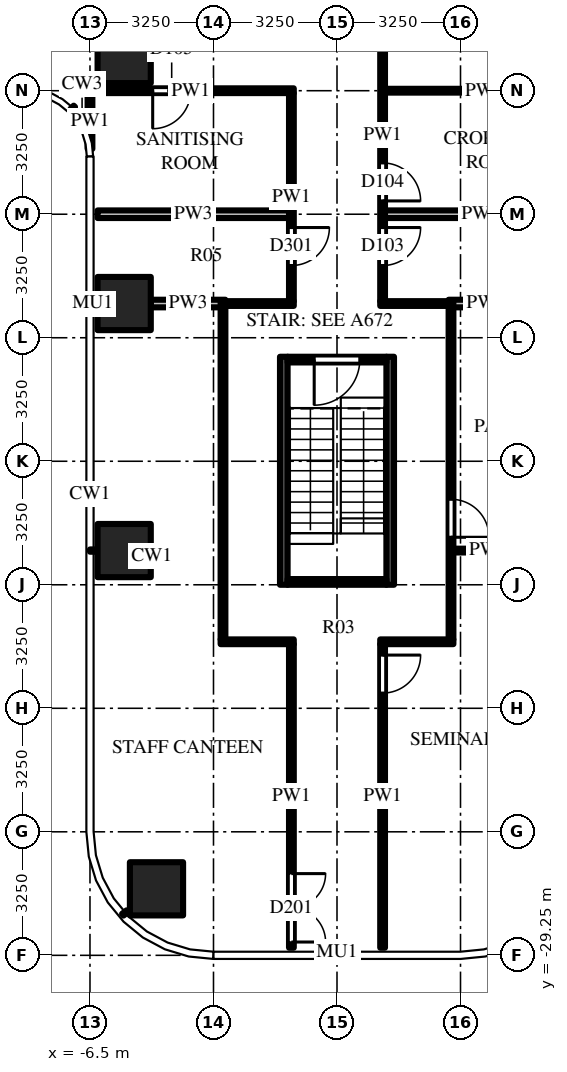
"""IFC4 building model, lengths in metres.
Left out: names, types, materials, properties, quantities, classifications, styles, units other than length and angle.
Written with IfcOpenShell. Run it as: python <this file> out.ifc"""

import sys

from ifc_helpers import new_model, si_unit, direction, frame, frame_2d, origin, origin_2d, place, context, subcontext, project, spatial, rectangle, extrude, source, transform, mapped, element, fill, save


model = new_model("IFC4")
c1 = context("Model", 3, precision=1e-05, world=origin(), true_north=direction((0.0, 1.0)))
c2 = subcontext(c1, "Body", "Model", "MODEL_VIEW")
j1 = project(units=[si_unit("LENGTHUNIT", "METRE"), si_unit("PLANEANGLEUNIT", "RADIAN")], contexts=[c1])
p1 = place(None, origin())
s1 = spatial("IfcSite", under=j1, at=p1, CompositionType="ELEMENT")
p2 = place(p1, origin())
s2 = spatial("IfcBuilding", under=s1, at=p2, CompositionType="ELEMENT")
p3 = place(p2, frame((0.0, 0.0, 47.5)))
s3 = spatial("IfcBuildingStorey", under=s2, at=p3, CompositionType="ELEMENT", Elevation=47.5)
m1 = source(origin(), c2, "Body", "SweptSolid", [
    extrude(rectangle(XDim=1.4, YDim=1.4, at=origin_2d()), origin(), (0.0, 0.0, 1.0), 4.5),
])
for number, where, z_axis, x_axis in (
    (1, (-5.6, -5.6, 0.0), (0.0, 0.0, 1.0), (1.0, 0.0, 0.0)),
    (2, (-5.6, -12.1, 0.0), (0.0, 0.0, 1.0), (1.0, 0.0, 0.0)),
    (3, (-5.6, -18.6, 0.0), (0.0, 0.0, 1.0), (1.0, 0.0, 0.0)),
    (4, (-4.75, -27.5, 0.0), (0.0, 0.0, 1.0), (1.0, 0.0, 0.0)),
):
    element("IfcColumn", number, at=place(p3, frame(where, z_axis=z_axis, x_axis=x_axis)), inside=s3, PredefinedType="COLUMN", context=c2, shape_type="MappedRepresentation", body=[
        mapped(m1, transform((0.0, 0.0, 0.0))),
    ])
m2 = source(origin(), c2, "Body", "SweptSolid", [
    extrude(rectangle(XDim=6.0, YDim=0.2, at=frame_2d((3.0, 0.0))), origin(), (0.0, 0.0, 1.0), 4.25),
])
for number, where, z_axis, x_axis in (
    (5, (1.4, -13.5, 0.0), (0.0, 0.0, 1.0), (0.0, -1.0, 0.0)),
    (6, (-1.4, -13.5, 0.0), (0.0, 0.0, 1.0), (0.0, -1.0, 0.0)),
):
    element("IfcWall", number, at=place(p3, frame(where, z_axis=z_axis, x_axis=x_axis)), inside=s3, PredefinedType="SHEAR", context=c2, shape_type="MappedRepresentation", body=[
        mapped(m2, transform((0.0, 0.0, 0.0))),
    ])
m3 = source(origin(), c2, "Body", "SweptSolid", [
    extrude(rectangle(XDim=2.6, YDim=0.15, at=frame_2d((1.3, 0.0))), origin(), (0.0, 0.0, 1.0), 4.25),
])
p4 = place(p3, frame((1.3, -13.575, 0.0), z_axis=(0.0, 0.0, 1.0), x_axis=(-1.0, 0.0, 0.0)))
e7 = element("IfcWall", 7, at=p4, inside=s3, PredefinedType="SHEAR", context=c2, shape_type="MappedRepresentation", body=[
    mapped(m3, transform((0.0, 0.0, 0.0))),
])
m4 = source(origin(), c2, "Body", "SweptSolid", [
    extrude(rectangle(XDim=1.2, YDim=2.1, at=frame_2d((0.6, 1.05))), frame((0.0, 0.085, 0.0), z_axis=(0.0, -1.0, 0.0), x_axis=(1.0, 0.0, 0.0)), (0.0, 0.0, 1.0), 0.17),
])
p5 = place(p4, frame((0.7, 0.0, 0.0)))
e8 = element("IfcOpeningElement", 8, at=p5, cuts=e7, PredefinedType="OPENING", context=c2, shape_type="MappedRepresentation", body=[
    mapped(m4, transform((0.0, 0.0, 0.0))),
])
p6 = place(p3, frame((1.3, -19.425, 0.0), z_axis=(0.0, 0.0, 1.0), x_axis=(-1.0, 0.0, 0.0)))
e9 = element("IfcWall", 9, at=p6, inside=s3, PredefinedType="SHEAR", context=c2, shape_type="MappedRepresentation", body=[
    mapped(m3, transform((0.0, 0.0, 0.0))),
])
m5 = source(origin(), c2, "Body", "SweptSolid", [
    extrude(rectangle(XDim=1.469, YDim=0.125, at=frame_2d((0.734, 0.0))), origin(), (0.0, 0.0, 1.0), 4.25),
])
p7 = place(p3, frame((-6.5, -6.562, 0.0), z_axis=(0.0, 0.0, 1.0), x_axis=(0.0, -1.0, 0.0)))
e10 = element("IfcWall", 10, at=p7, inside=s3, PredefinedType="PARTITIONING", context=c2, shape_type="MappedRepresentation", body=[
    mapped(m5, transform((0.0, 0.0, 0.0))),
])
m6 = source(origin(), c2, "Body", "SweptSolid", [
    extrude(rectangle(XDim=8.738, YDim=0.125, at=frame_2d((4.369, 0.0))), origin(), (0.0, 0.0, 1.0), 3.468),
])
p8 = place(p3, frame((-3.0, -20.938, 0.0), z_axis=(0.0, 0.0, 1.0), x_axis=(0.0, 1.0, 0.0)))
e11 = element("IfcWall", 11, at=p8, inside=s3, PredefinedType="PARTITIONING", context=c2, shape_type="MappedRepresentation", body=[
    mapped(m6, transform((0.0, 0.0, 0.0))),
])
m7 = source(origin(), c2, "Body", "SweptSolid", [
    extrude(rectangle(XDim=7.988, YDim=0.125, at=frame_2d((3.994, 0.0))), origin(), (0.0, 0.0, 1.0), 3.33),
])
p9 = place(p3, frame((-1.2, -21.062, 0.0), z_axis=(0.0, 0.0, 1.0), x_axis=(0.0, -1.0, 0.0)))
e12 = element("IfcWall", 12, at=p9, inside=s3, PredefinedType="PARTITIONING", context=c2, shape_type="MappedRepresentation", body=[
    mapped(m7, transform((0.0, 0.0, 0.0))),
])
m8 = source(origin(), c2, "Body", "SweptSolid", [
    extrude(rectangle(XDim=1.8, YDim=2.1, at=frame_2d((0.9, 1.05))), frame((0.0, 0.073, 0.0), z_axis=(0.0, -1.0, 0.0), x_axis=(1.0, 0.0, 0.0)), (0.0, 0.0, 1.0), 0.145),
])
p10 = place(p9, frame((6.038, 0.0, 0.0)))
e13 = element("IfcOpeningElement", 13, at=p10, cuts=e12, PredefinedType="OPENING", context=c2, shape_type="MappedRepresentation", body=[
    mapped(m8, transform((0.0, 0.0, 0.0))),
])
m9 = source(origin(), c2, "Body", "SweptSolid", [
    extrude(rectangle(XDim=5.475, YDim=0.125, at=frame_2d((2.738, 0.0))), origin(), (0.0, 0.0, 1.0), 3.468),
])
p11 = place(p3, frame((-1.2, -6.562, 0.0), z_axis=(0.0, 0.0, 1.0), x_axis=(0.0, -1.0, 0.0)))
e14 = element("IfcWall", 14, at=p11, inside=s3, PredefinedType="PARTITIONING", context=c2, shape_type="MappedRepresentation", body=[
    mapped(m9, transform((0.0, 0.0, 0.0))),
])
m10 = source(origin(), c2, "Body", "SweptSolid", [
    extrude(rectangle(XDim=1.0, YDim=2.1, at=frame_2d((0.5, 1.05))), frame((0.0, 0.073, 0.0), z_axis=(0.0, -1.0, 0.0), x_axis=(1.0, 0.0, 0.0)), (0.0, 0.0, 1.0), 0.145),
])
p12 = place(p11, frame((3.538, 0.0, 0.0)))
e15 = element("IfcOpeningElement", 15, at=p12, cuts=e14, PredefinedType="OPENING", context=c2, shape_type="MappedRepresentation", body=[
    mapped(m10, transform((0.0, 0.0, 0.0))),
])
p13 = place(p3, frame((1.2, -21.062, 0.0), z_axis=(0.0, 0.0, 1.0), x_axis=(0.0, -1.0, 0.0)))
e16 = element("IfcWall", 16, at=p13, inside=s3, PredefinedType="PARTITIONING", context=c2, shape_type="MappedRepresentation", body=[
    mapped(m7, transform((0.0, 0.0, 0.0))),
])
p14 = place(p13, frame((0.288, 0.0, 0.0)))
e17 = element("IfcOpeningElement", 17, at=p14, cuts=e16, PredefinedType="OPENING", context=c2, shape_type="MappedRepresentation", body=[
    mapped(m10, transform((0.0, 0.0, 0.0))),
])
m11 = source(origin(), c2, "Body", "SweptSolid", [
    extrude(rectangle(XDim=8.725, YDim=0.125, at=frame_2d((4.363, 0.0))), origin(), (0.0, 0.0, 1.0), 3.468),
])
p15 = place(p3, frame((1.2, -3.312, 0.0), z_axis=(0.0, 0.0, 1.0), x_axis=(0.0, -1.0, 0.0)))
e18 = element("IfcWall", 18, at=p15, inside=s3, PredefinedType="PARTITIONING", context=c2, shape_type="MappedRepresentation", body=[
    mapped(m11, transform((0.0, 0.0, 0.0))),
])
p16 = place(p15, frame((6.788, 0.0, 0.0)))
e19 = element("IfcOpeningElement", 19, at=p16, cuts=e18, PredefinedType="OPENING", context=c2, shape_type="MappedRepresentation", body=[
    mapped(m10, transform((0.0, 0.0, 0.0))),
])
p17 = place(p15, frame((5.087, 0.0, 0.0)))
e20 = element("IfcOpeningElement", 20, at=p17, cuts=e18, PredefinedType="OPENING", context=c2, shape_type="MappedRepresentation", body=[
    mapped(m10, transform((0.0, 0.0, 0.0))),
])
p18 = place(p3, frame((3.0, -12.2, 0.0), z_axis=(0.0, 0.0, 1.0), x_axis=(0.0, -1.0, 0.0)))
e21 = element("IfcWall", 21, at=p18, inside=s3, PredefinedType="PARTITIONING", context=c2, shape_type="MappedRepresentation", body=[
    mapped(m6, transform((0.0, 0.0, 0.0))),
])
p19 = place(p18, frame((5.05, 0.0, 0.0)))
e22 = element("IfcOpeningElement", 22, at=p19, cuts=e21, PredefinedType="OPENING", context=c2, shape_type="MappedRepresentation", body=[
    mapped(m10, transform((0.0, 0.0, 0.0))),
])
m12 = source(origin(), c2, "Body", "SweptSolid", [
    extrude(rectangle(XDim=1.925, YDim=0.125, at=frame_2d((0.962, 0.0))), origin(), (0.0, 0.0, 1.0), 4.25),
])
for number, where, z_axis, x_axis in (
    (23, (-1.137, -21.0, 0.0), (0.0, 0.0, 1.0), (-1.0, 0.0, 0.0)),
    (24, (3.062, -21.0, 0.0), (0.0, 0.0, 1.0), (-1.0, 0.0, 0.0)),
):
    element("IfcWall", number, at=place(p3, frame(where, z_axis=z_axis, x_axis=x_axis)), inside=s3, PredefinedType="PARTITIONING", context=c2, shape_type="MappedRepresentation", body=[
        mapped(m12, transform((0.0, 0.0, 0.0))),
    ])
m13 = source(origin(), c2, "Body", "SweptSolid", [
    extrude(rectangle(XDim=1.837, YDim=0.1, at=frame_2d((0.919, 0.0))), origin(), (0.0, 0.0, 1.0), 3.697),
])
p20 = place(p3, frame((3.062, -18.6, 0.0), z_axis=(0.0, 0.0, 1.0), x_axis=(1.0, 0.0, 0.0)))
e25 = element("IfcWall", 25, at=p20, inside=s3, PredefinedType="PARTITIONING", context=c2, shape_type="MappedRepresentation", body=[
    mapped(m13, transform((0.0, 0.0, 0.0))),
])
m14 = source(origin(), c2, "Body", "SweptSolid", [
    extrude(rectangle(XDim=1.962, YDim=0.2, at=frame_2d((0.981, 0.0))), origin(), (0.0, 0.0, 1.0), 3.468),
])
for number, where, z_axis, x_axis in (
    (26, (-4.9, -12.1, 0.0), (0.0, 0.0, 1.0), (1.0, 0.0, 0.0)),
    (27, (2.938, -12.1, 0.0), (0.0, 0.0, 1.0), (1.0, 0.0, 0.0)),
):
    element("IfcWall", number, at=place(p3, frame(where, z_axis=z_axis, x_axis=x_axis)), inside=s3, PredefinedType="PARTITIONING", context=c2, shape_type="MappedRepresentation", body=[
        mapped(m14, transform((0.0, 0.0, 0.0))),
    ])
m15 = source(origin(), c2, "Body", "SweptSolid", [
    extrude(rectangle(XDim=1.925, YDim=0.125, at=frame_2d((0.962, 0.0))), origin(), (0.0, 0.0, 1.0), 3.468),
])
for number, where, z_axis, x_axis in (
    (28, (-3.062, -12.1, 0.0), (0.0, 0.0, 1.0), (1.0, 0.0, 0.0)),
    (29, (1.137, -12.1, 0.0), (0.0, 0.0, 1.0), (1.0, 0.0, 0.0)),
):
    element("IfcWall", number, at=place(p3, frame(where, z_axis=z_axis, x_axis=x_axis)), inside=s3, PredefinedType="PARTITIONING", context=c2, shape_type="MappedRepresentation", body=[
        mapped(m15, transform((0.0, 0.0, 0.0))),
    ])
m16 = source(origin(), c2, "Body", "SweptSolid", [
    extrude(rectangle(XDim=5.038, YDim=0.2, at=frame_2d((2.519, 0.0))), origin(), (0.0, 0.0, 1.0), 3.33),
])
for number, where, z_axis, x_axis in (
    (30, (-6.3, -9.75, 0.0), (0.0, 0.0, 1.0), (1.0, 0.0, 0.0)),
    (31, (1.262, -9.75, 0.0), (0.0, 0.0, 1.0), (1.0, 0.0, 0.0)),
):
    element("IfcWall", number, at=place(p3, frame(where, z_axis=z_axis, x_axis=x_axis)), inside=s3, PredefinedType="PARTITIONING", context=c2, shape_type="MappedRepresentation", body=[
        mapped(m16, transform((0.0, 0.0, 0.0))),
    ])
m17 = source(origin(), c2, "Body", "SweptSolid", [
    extrude(rectangle(XDim=5.238, YDim=0.1, at=frame_2d((2.619, 0.0))), origin(), (0.0, 0.0, 1.0), 3.33),
])
p21 = place(p3, frame((1.262, -6.5, 0.0), z_axis=(0.0, 0.0, 1.0), x_axis=(1.0, 0.0, 0.0)))
e32 = element("IfcWall", 32, at=p21, inside=s3, PredefinedType="PARTITIONING", context=c2, shape_type="MappedRepresentation", body=[
    mapped(m17, transform((0.0, 0.0, 0.0))),
])
m18 = source(origin(), c2, "Body", "SweptSolid", [
    extrude(rectangle(XDim=5.425, YDim=0.125, at=frame_2d((2.712, 0.0))), origin(), (0.0, 0.0, 1.0), 3.33),
])
p22 = place(p3, frame((-1.137, -6.5, 0.0), z_axis=(0.0, 0.0, 1.0), x_axis=(-1.0, 0.0, 0.0)))
e33 = element("IfcWall", 33, at=p22, inside=s3, PredefinedType="PARTITIONING", context=c2, shape_type="MappedRepresentation", body=[
    mapped(m18, transform((0.0, 0.0, 0.0))),
])
p23 = place(p22, frame((2.712, 0.0, 0.0)))
e34 = element("IfcOpeningElement", 34, at=p23, cuts=e33, PredefinedType="OPENING", context=c2, shape_type="MappedRepresentation", body=[
    mapped(m10, transform((0.0, 0.0, 0.0))),
])
m19 = source(origin(), c2, "Body", "SweptSolid", [
    extrude(rectangle(XDim=1.2, YDim=2.1, at=frame_2d((0.6, 1.05))), frame((0.0, 0.025, 0.0), z_axis=(0.0, -1.0, 0.0), x_axis=(1.0, 0.0, 0.0)), (0.0, 0.0, 1.0), 0.05),
])
p24 = place(p5, origin())
e35 = element("IfcDoor", 35, at=p24, inside=s3, OperationType="SINGLE_SWING_RIGHT", PredefinedType="DOOR", context=c2, shape_type="MappedRepresentation", body=[
    mapped(m19, transform((0.0, 0.0, 0.0))),
])
fill(e8, e35)
m20 = source(origin(), c2, "Body", "SweptSolid", [
    extrude(rectangle(XDim=1.8, YDim=2.1, at=frame_2d((0.9, 1.05))), frame((0.0, 0.025, 0.0), z_axis=(0.0, -1.0, 0.0), x_axis=(1.0, 0.0, 0.0)), (0.0, 0.0, 1.0), 0.05),
])
p25 = place(p10, origin())
e36 = element("IfcDoor", 36, at=p25, inside=s3, OperationType="DOUBLE_DOOR_SINGLE_SWING", PredefinedType="DOOR", context=c2, shape_type="MappedRepresentation", body=[
    mapped(m20, transform((0.0, 0.0, 0.0))),
])
fill(e13, e36)
m21 = source(origin(), c2, "Body", "SweptSolid", [
    extrude(rectangle(XDim=1.0, YDim=2.1, at=frame_2d((0.5, 1.05))), frame((0.0, 0.025, 0.0), z_axis=(0.0, -1.0, 0.0), x_axis=(1.0, 0.0, 0.0)), (0.0, 0.0, 1.0), 0.05),
])
p26 = place(p14, origin())
e37 = element("IfcDoor", 37, at=p26, inside=s3, OperationType="SINGLE_SWING_LEFT", PredefinedType="DOOR", context=c2, shape_type="MappedRepresentation", body=[
    mapped(m21, transform((0.0, 0.0, 0.0))),
])
fill(e17, e37)
p27 = place(p19, origin())
e38 = element("IfcDoor", 38, at=p27, inside=s3, OperationType="SINGLE_SWING_RIGHT", PredefinedType="DOOR", context=c2, shape_type="MappedRepresentation", body=[
    mapped(m21, transform((0.0, 0.0, 0.0))),
])
fill(e22, e38)
p28 = place(p12, origin())
e39 = element("IfcDoor", 39, at=p28, inside=s3, OperationType="SINGLE_SWING_LEFT", PredefinedType="DOOR", context=c2, shape_type="MappedRepresentation", body=[
    mapped(m21, transform((0.0, 0.0, 0.0))),
])
fill(e15, e39)
p29 = place(p16, origin())
e40 = element("IfcDoor", 40, at=p29, inside=s3, OperationType="SINGLE_SWING_LEFT", PredefinedType="DOOR", context=c2, shape_type="MappedRepresentation", body=[
    mapped(m21, transform((0.0, 0.0, 0.0))),
])
fill(e19, e40)
p30 = place(p17, origin())
e41 = element("IfcDoor", 41, at=p30, inside=s3, OperationType="SINGLE_SWING_RIGHT", PredefinedType="DOOR", context=c2, shape_type="MappedRepresentation", body=[
    mapped(m21, transform((0.0, 0.0, 0.0))),
])
fill(e20, e41)
p31 = place(p23, origin())
e42 = element("IfcDoor", 42, at=p31, inside=s3, OperationType="SINGLE_SWING_RIGHT", PredefinedType="DOOR", context=c2, shape_type="MappedRepresentation", body=[
    mapped(m21, transform((0.0, 0.0, 0.0))),
])
fill(e34, e42)
save(model, sys.argv[1])
